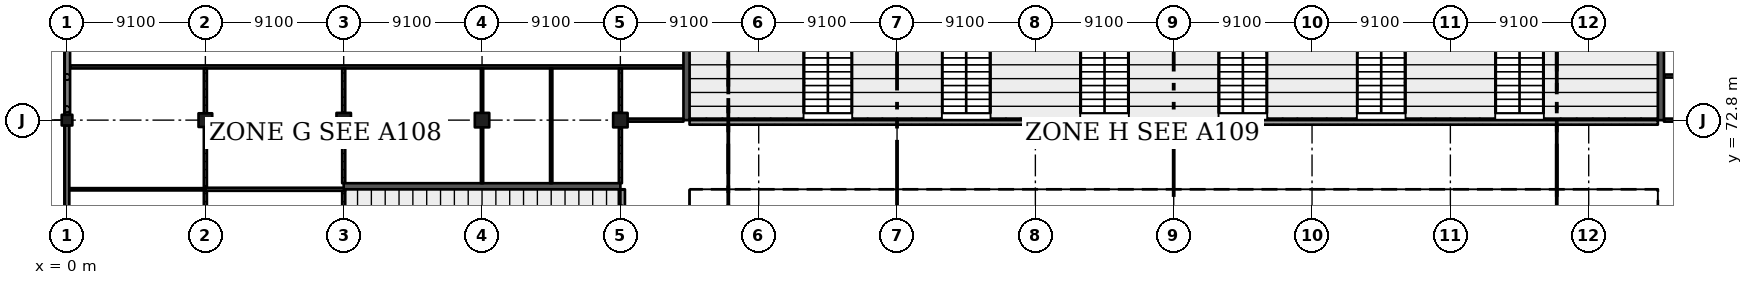
"""IFC4 building model, lengths in metres.
Left out: names, types, materials, properties, quantities, classifications, styles, units other than length and angle.
Written with IfcOpenShell. Run it as: python <this file> out.ifc"""

import sys

from ifc_helpers import new_model, si_unit, direction, frame, frame_2d, origin, origin_2d, place, context, subcontext, project, spatial, rectangle, extrude, element, fill, save


model = new_model("IFC4")
c1 = context("Model", 3, precision=1e-05, world=origin(), true_north=direction((0.0, 1.0)))
c2 = subcontext(c1, "Body", "Model", "MODEL_VIEW")
j1 = project(units=[si_unit("LENGTHUNIT", "METRE"), si_unit("PLANEANGLEUNIT", "RADIAN")], contexts=[c1])
p1 = place(None, origin())
s1 = spatial("IfcSite", under=j1, at=p1, CompositionType="ELEMENT")
p2 = place(p1, origin())
s2 = spatial("IfcBuilding", under=s1, at=p2, CompositionType="ELEMENT")
p3 = place(p2, origin())
s3 = spatial("IfcBuildingStorey", under=s2, at=p3, CompositionType="ELEMENT", Elevation=0.0)
p4 = place(p3, frame((0.0, 72.8, -0.4), z_axis=(0.0, 0.0, 1.0), x_axis=(1.0, 0.0, 0.0)))
e1 = element("IfcColumn", 1, at=p4, inside=s3, PredefinedType="COLUMN", context=c2, shape_type="SweptSolid", body=[
    extrude(rectangle(XDim=0.7, YDim=0.7, at=origin_2d()), origin(), (0.0, 0.0, 1.0), 6.77),
])
p5 = place(p3, frame((9.1, 72.8, -0.4), z_axis=(0.0, 0.0, 1.0), x_axis=(1.0, 0.0, 0.0)))
e2 = element("IfcColumn", 2, at=p5, inside=s3, PredefinedType="COLUMN", context=c2, shape_type="SweptSolid", body=[
    extrude(rectangle(XDim=0.9, YDim=0.9, at=origin_2d()), origin(), (0.0, 0.0, 1.0), 6.77),
])
for number, where, z_axis, x_axis in (
    (3, (18.2, 72.8, -0.4), (0.0, 0.0, 1.0), (1.0, 0.0, 0.0)),
    (4, (27.3, 72.8, -0.4), (0.0, 0.0, 1.0), (1.0, 0.0, 0.0)),
    (5, (36.4, 72.8, -0.4), (0.0, 0.0, 1.0), (1.0, 0.0, 0.0)),
):
    element("IfcColumn", number, at=place(p3, frame(where, z_axis=z_axis, x_axis=x_axis)), inside=s3, PredefinedType="COLUMN", context=c2, shape_type="SweptSolid", body=[
        extrude(rectangle(XDim=0.95, YDim=0.95, at=origin_2d()), origin(), (0.0, 0.0, 1.0), 6.77),
    ])
p6 = place(p3, frame((40.95, 72.65, -0.4), z_axis=(0.0, 0.0, 1.0), x_axis=(1.0, 0.0, 0.0)))
e6 = element("IfcWall", 6, at=p6, inside=s3, PredefinedType="SOLIDWALL", context=c2, shape_type="SweptSolid", body=[
    extrude(rectangle(XDim=63.7, YDim=0.3, at=frame_2d((31.85, 0.0))), origin(), (0.0, 0.0, 1.0), 1.45),
])
p7 = place(p3, frame((36.55, 40.95, -0.4), z_axis=(0.0, 0.0, 1.0), x_axis=(0.0, 1.0, 0.0)))
e7 = element("IfcWall", 7, at=p7, inside=s3, PredefinedType="SOLIDWALL", context=c2, shape_type="SweptSolid", body=[
    extrude(rectangle(XDim=27.3, YDim=0.3, at=frame_2d((13.65, 0.0))), origin(), (0.0, 0.0, 1.0), 1.45),
])
for number, where, z_axis, x_axis in (
    (8, (40.75, 72.8, -0.4), (0.0, 0.0, 1.0), (0.0, 1.0, 0.0)),
    (9, (104.85, 72.8, -0.4), (0.0, 0.0, 1.0), (0.0, 1.0, 0.0)),
    (10, (36.4, 68.45, -0.4), (0.0, 0.0, 1.0), (-1.0, 0.0, 0.0)),
):
    element("IfcWall", number, at=place(p3, frame(where, z_axis=z_axis, x_axis=x_axis)), inside=s3, PredefinedType="SHEAR", context=c2, shape_type="SweptSolid", body=[
        extrude(rectangle(XDim=18.2, YDim=0.4, at=frame_2d((9.1, 0.0))), origin(), (0.0, 0.0, 1.0), 6.77),
    ])
p8 = place(p3, frame((0.025, 81.65, 0.0), z_axis=(0.0, 0.0, 1.0), x_axis=(0.0, -1.0, 0.0)))
e11 = element("IfcWall", 11, at=p8, inside=s3, PredefinedType="SOLIDWALL", context=c2, shape_type="SweptSolid", body=[
    extrude(rectangle(XDim=8.5, YDim=0.35, at=frame_2d((4.25, 0.0))), origin(), (0.0, 0.0, 1.0), 5.27),
])
p9 = place(p3, frame((0.0, 72.45, 0.0), z_axis=(0.0, 0.0, 1.0), x_axis=(0.0, -1.0, 0.0)))
e12 = element("IfcWall", 12, at=p9, inside=s3, PredefinedType="SOLIDWALL", context=c2, shape_type="SweptSolid", body=[
    extrude(rectangle(XDim=8.425, YDim=0.3, at=frame_2d((4.212, 0.0))), origin(), (0.0, 0.0, 1.0), 5.27),
])
p10 = place(p3, frame((0.2, 76.3, 0.0), z_axis=(0.0, 0.0, 1.0), x_axis=(1.0, 0.0, 0.0)))
e13 = element("IfcWall", 13, at=p10, inside=s3, PredefinedType="PARTITIONING", context=c2, shape_type="SweptSolid", body=[
    extrude(rectangle(XDim=40.35, YDim=0.2, at=frame_2d((20.175, 0.0))), origin(), (0.0, 0.0, 1.0), 6.02),
])
p11 = place(p10, frame((3.85, 0.0, 0.0)))
e14 = element("IfcOpeningElement", 14, at=p11, cuts=e13, PredefinedType="OPENING", context=c2, shape_type="SweptSolid", body=[
    extrude(rectangle(XDim=1.1, YDim=2.1, at=frame_2d((0.55, 1.05))), frame((0.0, 0.11, 0.0), z_axis=(0.0, -1.0, 0.0), x_axis=(1.0, 0.0, 0.0)), (0.0, 0.0, 1.0), 0.22),
])
p12 = place(p10, frame((21.95, 0.0, 0.0)))
e15 = element("IfcOpeningElement", 15, at=p12, cuts=e13, PredefinedType="OPENING", context=c2, shape_type="SweptSolid", body=[
    extrude(rectangle(XDim=1.1, YDim=2.1, at=frame_2d((0.55, 1.05))), frame((0.0, 0.11, 0.0), z_axis=(0.0, -1.0, 0.0), x_axis=(1.0, 0.0, 0.0)), (0.0, 0.0, 1.0), 0.22),
])
p13 = place(p10, frame((28.75, 0.0, 0.0)))
e16 = element("IfcOpeningElement", 16, at=p13, cuts=e13, PredefinedType="OPENING", context=c2, shape_type="SweptSolid", body=[
    extrude(rectangle(XDim=1.2, YDim=2.1, at=frame_2d((0.6, 1.05))), frame((0.0, 0.11, 0.0), z_axis=(0.0, -1.0, 0.0), x_axis=(1.0, 0.0, 0.0)), (0.0, 0.0, 1.0), 0.22),
])
p14 = place(p10, frame((33.5, 0.0, 0.0)))
e17 = element("IfcOpeningElement", 17, at=p14, cuts=e13, PredefinedType="OPENING", context=c2, shape_type="SweptSolid", body=[
    extrude(rectangle(XDim=0.9, YDim=2.0, at=frame_2d((0.45, 1.0))), frame((0.0, 0.11, 0.0), z_axis=(0.0, -1.0, 0.0), x_axis=(1.0, 0.0, 0.0)), (0.0, 0.0, 1.0), 0.22),
])
p15 = place(p10, frame((14.55, 0.0, 0.0)))
e18 = element("IfcOpeningElement", 18, at=p15, cuts=e13, PredefinedType="OPENING", context=c2, shape_type="SweptSolid", body=[
    extrude(rectangle(XDim=2.4, YDim=2.4, at=frame_2d((1.2, 1.2))), frame((0.0, 0.11, 0.0), z_axis=(0.0, -1.0, 0.0), x_axis=(1.0, 0.0, 0.0)), (0.0, 0.0, 1.0), 0.22),
])
p16 = place(p10, frame((9.95, 0.0, 0.0)))
e19 = element("IfcOpeningElement", 19, at=p16, cuts=e13, PredefinedType="OPENING", context=c2, shape_type="SweptSolid", body=[
    extrude(rectangle(XDim=2.4, YDim=2.4, at=frame_2d((1.2, 1.2))), frame((0.0, 0.11, 0.0), z_axis=(0.0, -1.0, 0.0), x_axis=(1.0, 0.0, 0.0)), (0.0, 0.0, 1.0), 0.22),
])
p17 = place(p10, frame((37.1, 0.0, 0.0)))
e20 = element("IfcOpeningElement", 20, at=p17, cuts=e13, PredefinedType="OPENING", context=c2, shape_type="SweptSolid", body=[
    extrude(rectangle(XDim=2.4, YDim=2.4, at=frame_2d((1.2, 1.2))), frame((0.0, 0.11, 0.0), z_axis=(0.0, -1.0, 0.0), x_axis=(1.0, 0.0, 0.0)), (0.0, 0.0, 1.0), 0.22),
])
p18 = place(p3, frame((9.1, 64.125, 0.0), z_axis=(0.0, 0.0, 1.0), x_axis=(0.0, 1.0, 0.0)))
e21 = element("IfcWall", 21, at=p18, inside=s3, PredefinedType="PARTITIONING", context=c2, shape_type="SweptSolid", body=[
    extrude(rectangle(XDim=4.025, YDim=0.2, at=frame_2d((2.012, 0.0))), origin(), (0.0, 0.0, 1.0), 5.32),
])
p19 = place(p18, frame((1.45, 0.0, 0.0)))
e22 = element("IfcOpeningElement", 22, at=p19, cuts=e21, PredefinedType="OPENING", context=c2, shape_type="SweptSolid", body=[
    extrude(rectangle(XDim=1.2, YDim=2.1, at=frame_2d((0.6, 1.05))), frame((0.0, 0.11, 0.0), z_axis=(0.0, -1.0, 0.0), x_axis=(1.0, 0.0, 0.0)), (0.0, 0.0, 1.0), 0.22),
])
p20 = place(p3, frame((9.1, 68.25, 0.0), z_axis=(0.0, 0.0, 1.0), x_axis=(-1.0, 0.0, 0.0)))
e23 = element("IfcWall", 23, at=p20, inside=s3, PredefinedType="PARTITIONING", context=c2, shape_type="SweptSolid", body=[
    extrude(rectangle(XDim=8.95, YDim=0.15, at=frame_2d((4.475, 0.0))), origin(), (0.0, 0.0, 1.0), 6.02),
])
p21 = place(p3, frame((9.1, 72.35, 0.0), z_axis=(0.0, 0.0, 1.0), x_axis=(0.0, -1.0, 0.0)))
e24 = element("IfcWall", 24, at=p21, inside=s3, PredefinedType="PARTITIONING", context=c2, shape_type="SweptSolid", body=[
    extrude(rectangle(XDim=4.0, YDim=0.2, at=frame_2d((2.0, 0.0))), origin(), (0.0, 0.0, 1.0), 5.32),
])
p22 = place(p3, frame((9.1, 76.2, 0.0), z_axis=(0.0, 0.0, 1.0), x_axis=(0.0, -1.0, 0.0)))
e25 = element("IfcWall", 25, at=p22, inside=s3, PredefinedType="PARTITIONING", context=c2, shape_type="SweptSolid", body=[
    extrude(rectangle(XDim=2.95, YDim=0.2, at=frame_2d((1.475, 0.0))), origin(), (0.0, 0.0, 1.0), 5.32),
])
p23 = place(p3, frame((18.2, 68.15, 0.0), z_axis=(0.0, 0.0, 1.0), x_axis=(0.0, -1.0, 0.0)))
e26 = element("IfcWall", 26, at=p23, inside=s3, PredefinedType="PARTITIONING", context=c2, shape_type="SweptSolid", body=[
    extrude(rectangle(XDim=4.15, YDim=0.2, at=frame_2d((2.075, 0.0))), origin(), (0.0, 0.0, 1.0), 5.02),
])
p24 = place(p3, frame((18.2, 68.65, 0.0), z_axis=(0.0, 0.0, 1.0), x_axis=(0.0, 1.0, 0.0)))
e27 = element("IfcWall", 27, at=p24, inside=s3, PredefinedType="PARTITIONING", context=c2, shape_type="SweptSolid", body=[
    extrude(rectangle(XDim=3.675, YDim=0.2, at=frame_2d((1.837, 0.0))), origin(), (0.0, 0.0, 1.0), 5.02),
])
p25 = place(p3, frame((18.2, 73.275, 0.0), z_axis=(0.0, 0.0, 1.0), x_axis=(0.0, 1.0, 0.0)))
e28 = element("IfcWall", 28, at=p25, inside=s3, PredefinedType="PARTITIONING", context=c2, shape_type="SweptSolid", body=[
    extrude(rectangle(XDim=2.925, YDim=0.2, at=frame_2d((1.462, 0.0))), origin(), (0.0, 0.0, 1.0), 5.32),
])
p26 = place(p3, frame((18.3, 68.25, 0.0), z_axis=(0.0, 0.0, 1.0), x_axis=(-1.0, 0.0, 0.0)))
e29 = element("IfcWall", 29, at=p26, inside=s3, PredefinedType="PARTITIONING", context=c2, shape_type="SweptSolid", body=[
    extrude(rectangle(XDim=9.2, YDim=0.2, at=frame_2d((4.6, 0.0))), origin(), (0.0, 0.0, 1.0), 6.02),
])
p27 = place(p26, frame((0.85, 0.0, 0.0)))
e30 = element("IfcOpeningElement", 30, at=p27, cuts=e29, PredefinedType="OPENING", context=c2, shape_type="SweptSolid", body=[
    extrude(rectangle(XDim=3.0, YDim=2.4, at=frame_2d((1.5, 1.2))), frame((0.0, 0.11, 0.0), z_axis=(0.0, -1.0, 0.0), x_axis=(1.0, 0.0, 0.0)), (0.0, 0.0, 1.0), 0.22),
])
p28 = place(p26, frame((5.45, 0.0, 0.0)))
e31 = element("IfcOpeningElement", 31, at=p28, cuts=e29, PredefinedType="OPENING", context=c2, shape_type="SweptSolid", body=[
    extrude(rectangle(XDim=3.0, YDim=2.4, at=frame_2d((1.5, 1.2))), frame((0.0, 0.11, 0.0), z_axis=(0.0, -1.0, 0.0), x_axis=(1.0, 0.0, 0.0)), (0.0, 0.0, 1.0), 0.22),
])
p29 = place(p3, frame((27.3, 72.325, 0.0), z_axis=(0.0, 0.0, 1.0), x_axis=(0.0, -1.0, 0.0)))
e32 = element("IfcWall", 32, at=p29, inside=s3, PredefinedType="PARTITIONING", context=c2, shape_type="SweptSolid", body=[
    extrude(rectangle(XDim=3.675, YDim=0.15, at=frame_2d((1.837, 0.0))), origin(), (0.0, 0.0, 1.0), 6.02),
])
p30 = place(p3, frame((27.3, 76.2, 0.0), z_axis=(0.0, 0.0, 1.0), x_axis=(0.0, -1.0, 0.0)))
e33 = element("IfcWall", 33, at=p30, inside=s3, PredefinedType="PARTITIONING", context=c2, shape_type="SweptSolid", body=[
    extrude(rectangle(XDim=2.925, YDim=0.15, at=frame_2d((1.462, 0.0))), origin(), (0.0, 0.0, 1.0), 5.32),
])
p31 = place(p3, frame((31.85, 76.2, 0.0), z_axis=(0.0, 0.0, 1.0), x_axis=(0.0, -1.0, 0.0)))
e34 = element("IfcWall", 34, at=p31, inside=s3, PredefinedType="PARTITIONING", context=c2, shape_type="SweptSolid", body=[
    extrude(rectangle(XDim=7.55, YDim=0.15, at=frame_2d((3.775, 0.0))), origin(), (0.0, 0.0, 1.0), 6.02),
])
p32 = place(p3, frame((36.4, 72.325, 0.0), z_axis=(0.0, 0.0, 1.0), x_axis=(0.0, -1.0, 0.0)))
e35 = element("IfcWall", 35, at=p32, inside=s3, PredefinedType="PARTITIONING", context=c2, shape_type="SweptSolid", body=[
    extrude(rectangle(XDim=3.675, YDim=0.2, at=frame_2d((1.837, 0.0))), origin(), (0.0, 0.0, 1.0), 6.02),
])
p33 = place(p3, frame((36.4, 76.2, 0.0), z_axis=(0.0, 0.0, 1.0), x_axis=(0.0, -1.0, 0.0)))
e36 = element("IfcWall", 36, at=p33, inside=s3, PredefinedType="PARTITIONING", context=c2, shape_type="SweptSolid", body=[
    extrude(rectangle(XDim=2.925, YDim=0.2, at=frame_2d((1.462, 0.0))), origin(), (0.0, 0.0, 1.0), 5.32),
])
p34 = place(p3, frame((40.55, 72.8, 0.0), z_axis=(0.0, 0.0, 1.0), x_axis=(-1.0, 0.0, 0.0)))
e37 = element("IfcWall", 37, at=p34, inside=s3, PredefinedType="PARTITIONING", context=c2, shape_type="SweptSolid", body=[
    extrude(rectangle(XDim=3.675, YDim=0.2, at=frame_2d((1.837, 0.0))), origin(), (0.0, 0.0, 1.0), 6.02),
])
p35 = place(p34, frame((0.65, 0.0, 0.0)))
e38 = element("IfcOpeningElement", 38, at=p35, cuts=e37, PredefinedType="OPENING", context=c2, shape_type="SweptSolid", body=[
    extrude(rectangle(XDim=2.4, YDim=2.4, at=frame_2d((1.2, 1.2))), frame((0.0, 0.11, 0.0), z_axis=(0.0, -1.0, 0.0), x_axis=(1.0, 0.0, 0.0)), (0.0, 0.0, 1.0), 0.22),
])
p36 = place(p3, frame((108.725, 72.8, 0.0), z_axis=(0.0, 0.0, 1.0), x_axis=(-1.0, 0.0, 0.0)))
e39 = element("IfcWall", 39, at=p36, inside=s3, PredefinedType="PARTITIONING", context=c2, shape_type="SweptSolid", body=[
    extrude(rectangle(XDim=3.675, YDim=0.2, at=frame_2d((1.837, 0.0))), origin(), (0.0, 0.0, 1.0), 6.02),
])
p37 = place(p36, frame((0.65, 0.0, 0.0)))
e40 = element("IfcOpeningElement", 40, at=p37, cuts=e39, PredefinedType="OPENING", context=c2, shape_type="SweptSolid", body=[
    extrude(rectangle(XDim=2.4, YDim=2.4, at=frame_2d((1.2, 1.2))), frame((0.0, 0.11, 0.0), z_axis=(0.0, -1.0, 0.0), x_axis=(1.0, 0.0, 0.0)), (0.0, 0.0, 1.0), 0.22),
])
p38 = place(p3, frame((105.05, 75.7, 0.0), z_axis=(0.0, 0.0, 1.0), x_axis=(1.0, 0.0, 0.0)))
e41 = element("IfcWall", 41, at=p38, inside=s3, PredefinedType="PARTITIONING", context=c2, shape_type="SweptSolid", body=[
    extrude(rectangle(XDim=40.35, YDim=0.2, at=frame_2d((20.175, 0.0))), origin(), (0.0, 0.0, 1.0), 6.02),
])
p39 = place(p38, frame((35.3, 0.0, 0.0)))
e42 = element("IfcOpeningElement", 42, at=p39, cuts=e41, PredefinedType="OPENING", context=c2, shape_type="SweptSolid", body=[
    extrude(rectangle(XDim=1.1, YDim=2.1, at=frame_2d((0.55, 1.05))), frame((0.0, 0.11, 0.0), z_axis=(0.0, -1.0, 0.0), x_axis=(1.0, 0.0, 0.0)), (0.0, 0.0, 1.0), 0.22),
])
p40 = place(p38, frame((17.3, 0.0, 0.0)))
e43 = element("IfcOpeningElement", 43, at=p40, cuts=e41, PredefinedType="OPENING", context=c2, shape_type="SweptSolid", body=[
    extrude(rectangle(XDim=1.1, YDim=2.1, at=frame_2d((0.55, 1.05))), frame((0.0, 0.11, 0.0), z_axis=(0.0, -1.0, 0.0), x_axis=(1.0, 0.0, 0.0)), (0.0, 0.0, 1.0), 0.22),
])
p41 = place(p38, frame((10.45, 0.0, 0.0)))
e44 = element("IfcOpeningElement", 44, at=p41, cuts=e41, PredefinedType="OPENING", context=c2, shape_type="SweptSolid", body=[
    extrude(rectangle(XDim=1.0, YDim=2.1, at=frame_2d((0.5, 1.05))), frame((0.0, 0.11, 0.0), z_axis=(0.0, -1.0, 0.0), x_axis=(1.0, 0.0, 0.0)), (0.0, 0.0, 1.0), 0.22),
])
p42 = place(p38, frame((5.9, 0.0, 0.0)))
e45 = element("IfcOpeningElement", 45, at=p42, cuts=e41, PredefinedType="OPENING", context=c2, shape_type="SweptSolid", body=[
    extrude(rectangle(XDim=1.0, YDim=2.1, at=frame_2d((0.5, 1.05))), frame((0.0, 0.11, 0.0), z_axis=(0.0, -1.0, 0.0), x_axis=(1.0, 0.0, 0.0)), (0.0, 0.0, 1.0), 0.22),
])
p43 = place(p38, frame((28.0, 0.0, 0.0)))
e46 = element("IfcOpeningElement", 46, at=p43, cuts=e41, PredefinedType="OPENING", context=c2, shape_type="SweptSolid", body=[
    extrude(rectangle(XDim=2.4, YDim=2.4, at=frame_2d((1.2, 1.2))), frame((0.0, 0.11, 0.0), z_axis=(0.0, -1.0, 0.0), x_axis=(1.0, 0.0, 0.0)), (0.0, 0.0, 1.0), 0.22),
])
p44 = place(p38, frame((23.4, 0.0, 0.0)))
e47 = element("IfcOpeningElement", 47, at=p44, cuts=e41, PredefinedType="OPENING", context=c2, shape_type="SweptSolid", body=[
    extrude(rectangle(XDim=2.4, YDim=2.4, at=frame_2d((1.2, 1.2))), frame((0.0, 0.11, 0.0), z_axis=(0.0, -1.0, 0.0), x_axis=(1.0, 0.0, 0.0)), (0.0, 0.0, 1.0), 0.22),
])
p45 = place(p38, frame((0.9, 0.0, 0.0)))
e48 = element("IfcOpeningElement", 48, at=p45, cuts=e41, PredefinedType="OPENING", context=c2, shape_type="SweptSolid", body=[
    extrude(rectangle(XDim=2.4, YDim=2.4, at=frame_2d((1.2, 1.2))), frame((0.0, 0.11, 0.0), z_axis=(0.0, -1.0, 0.0), x_axis=(1.0, 0.0, 0.0)), (0.0, 0.0, 1.0), 0.22),
])
p46 = place(p11, origin())
e49 = element("IfcDoor", 49, at=p46, inside=s3, OperationType="SINGLE_SWING_LEFT", PredefinedType="DOOR", context=c2, shape_type="SweptSolid", body=[
    extrude(rectangle(XDim=1.1, YDim=2.1, at=frame_2d((0.55, 1.05))), frame((0.0, 0.025, 0.0), z_axis=(0.0, -1.0, 0.0), x_axis=(1.0, 0.0, 0.0)), (0.0, 0.0, 1.0), 0.05),
])
fill(e14, e49)
p47 = place(p12, origin())
e50 = element("IfcDoor", 50, at=p47, inside=s3, OperationType="SINGLE_SWING_LEFT", PredefinedType="DOOR", context=c2, shape_type="SweptSolid", body=[
    extrude(rectangle(XDim=1.1, YDim=2.1, at=frame_2d((0.55, 1.05))), frame((0.0, 0.025, 0.0), z_axis=(0.0, -1.0, 0.0), x_axis=(1.0, 0.0, 0.0)), (0.0, 0.0, 1.0), 0.05),
])
fill(e15, e50)
p48 = place(p13, origin())
e51 = element("IfcDoor", 51, at=p48, inside=s3, OperationType="SINGLE_SWING_LEFT", PredefinedType="DOOR", context=c2, shape_type="SweptSolid", body=[
    extrude(rectangle(XDim=1.2, YDim=2.1, at=frame_2d((0.6, 1.05))), frame((0.0, 0.025, 0.0), z_axis=(0.0, -1.0, 0.0), x_axis=(1.0, 0.0, 0.0)), (0.0, 0.0, 1.0), 0.05),
])
fill(e16, e51)
p49 = place(p14, origin())
e52 = element("IfcDoor", 52, at=p49, inside=s3, OperationType="SINGLE_SWING_RIGHT", PredefinedType="DOOR", context=c2, shape_type="SweptSolid", body=[
    extrude(rectangle(XDim=0.9, YDim=2.0, at=frame_2d((0.45, 1.0))), frame((0.0, 0.025, 0.0), z_axis=(0.0, -1.0, 0.0), x_axis=(1.0, 0.0, 0.0)), (0.0, 0.0, 1.0), 0.05),
])
fill(e17, e52)
p50 = place(p15, origin())
e53 = element("IfcDoor", 53, at=p50, inside=s3, OperationType="DOUBLE_DOOR_SINGLE_SWING", PredefinedType="DOOR", context=c2, shape_type="SweptSolid", body=[
    extrude(rectangle(XDim=2.4, YDim=2.4, at=frame_2d((1.2, 1.2))), frame((0.0, 0.025, 0.0), z_axis=(0.0, -1.0, 0.0), x_axis=(1.0, 0.0, 0.0)), (0.0, 0.0, 1.0), 0.05),
])
fill(e18, e53)
p51 = place(p16, origin())
e54 = element("IfcDoor", 54, at=p51, inside=s3, OperationType="DOUBLE_DOOR_SINGLE_SWING", PredefinedType="DOOR", context=c2, shape_type="SweptSolid", body=[
    extrude(rectangle(XDim=2.4, YDim=2.4, at=frame_2d((1.2, 1.2))), frame((0.0, 0.025, 0.0), z_axis=(0.0, -1.0, 0.0), x_axis=(1.0, 0.0, 0.0)), (0.0, 0.0, 1.0), 0.05),
])
fill(e19, e54)
p52 = place(p17, origin())
e55 = element("IfcDoor", 55, at=p52, inside=s3, OperationType="DOUBLE_DOOR_SINGLE_SWING", PredefinedType="DOOR", context=c2, shape_type="SweptSolid", body=[
    extrude(rectangle(XDim=2.4, YDim=2.4, at=frame_2d((1.2, 1.2))), frame((0.0, 0.025, 0.0), z_axis=(0.0, -1.0, 0.0), x_axis=(1.0, 0.0, 0.0)), (0.0, 0.0, 1.0), 0.05),
])
fill(e20, e55)
p53 = place(p35, origin())
e56 = element("IfcDoor", 56, at=p53, inside=s3, OperationType="DOUBLE_DOOR_SINGLE_SWING", PredefinedType="DOOR", context=c2, shape_type="SweptSolid", body=[
    extrude(rectangle(XDim=2.4, YDim=2.4, at=frame_2d((1.2, 1.2))), frame((0.0, 0.025, 0.0), z_axis=(0.0, -1.0, 0.0), x_axis=(1.0, 0.0, 0.0)), (0.0, 0.0, 1.0), 0.05),
])
fill(e38, e56)
p54 = place(p27, origin())
e57 = element("IfcDoor", 57, at=p54, inside=s3, OperationType="DOUBLE_DOOR_SINGLE_SWING", PredefinedType="DOOR", context=c2, shape_type="SweptSolid", body=[
    extrude(rectangle(XDim=3.0, YDim=2.4, at=frame_2d((1.5, 1.2))), frame((0.0, 0.025, 0.0), z_axis=(0.0, -1.0, 0.0), x_axis=(1.0, 0.0, 0.0)), (0.0, 0.0, 1.0), 0.05),
])
fill(e30, e57)
p55 = place(p28, origin())
e58 = element("IfcDoor", 58, at=p55, inside=s3, OperationType="DOUBLE_DOOR_SINGLE_SWING", PredefinedType="DOOR", context=c2, shape_type="SweptSolid", body=[
    extrude(rectangle(XDim=3.0, YDim=2.4, at=frame_2d((1.5, 1.2))), frame((0.0, 0.025, 0.0), z_axis=(0.0, -1.0, 0.0), x_axis=(1.0, 0.0, 0.0)), (0.0, 0.0, 1.0), 0.05),
])
fill(e31, e58)
save(model, sys.argv[1])
